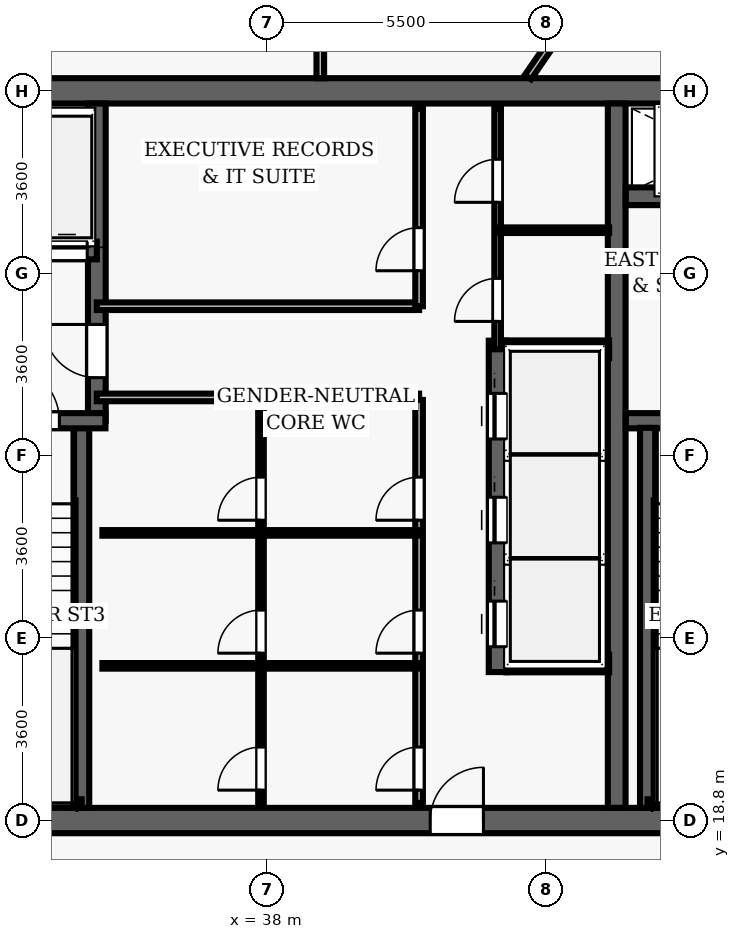
"""IFC4 building model, lengths in metres.
Left out: names, types, materials, properties, quantities, classifications, styles, units other than length and angle.
Written with IfcOpenShell. Run it as: python <this file> out.ifc"""

import sys

from ifc_helpers import new_model, si_unit, direction, frame, frame_2d, origin, place, context, subcontext, project, spatial, rectangle, extrude, element, fill, save


model = new_model("IFC4")
c1 = context("Model", 3, precision=1e-05, world=origin(), true_north=direction((0.0, 1.0)))
c2 = subcontext(c1, "Body", "Model", "MODEL_VIEW")
j1 = project(units=[si_unit("LENGTHUNIT", "METRE"), si_unit("PLANEANGLEUNIT", "RADIAN")], contexts=[c1])
p1 = place(None, origin())
s1 = spatial("IfcSite", under=j1, at=p1, CompositionType="ELEMENT")
p2 = place(p1, origin())
s2 = spatial("IfcBuilding", under=s1, at=p2, CompositionType="ELEMENT")
p3 = place(p2, frame((0.0, 0.0, 295.95)))
s3 = spatial("IfcBuildingStorey", under=s2, at=p3, CompositionType="ELEMENT", Elevation=295.95)
p4 = place(p3, frame((26.75, 18.8, 0.0), z_axis=(0.0, 0.0, 1.0), x_axis=(1.0, 0.0, 0.0)))
e1 = element("IfcWall", 1, at=p4, inside=s3, PredefinedType="SHEAR", context=c2, shape_type="SweptSolid", body=[
    extrude(rectangle(XDim=22.5, YDim=0.5, at=frame_2d((11.25, 0.0))), origin(), (0.0, 0.0, 1.0), 3.85),
])
p5 = place(p4, frame((14.47, 0.0, 0.0)))
e2 = element("IfcOpeningElement", 2, at=p5, cuts=e1, PredefinedType="OPENING", context=c2, shape_type="SweptSolid", body=[
    extrude(rectangle(XDim=1.05, YDim=2.15, at=frame_2d((0.525, 1.075))), frame((0.0, 0.26, 0.0), z_axis=(0.0, -1.0, 0.0), x_axis=(1.0, 0.0, 0.0)), (0.0, 0.0, 1.0), 0.52),
])
p6 = place(p3, frame((26.75, 33.2, 0.0), z_axis=(0.0, 0.0, 1.0), x_axis=(1.0, 0.0, 0.0)))
e3 = element("IfcWall", 3, at=p6, inside=s3, PredefinedType="SHEAR", context=c2, shape_type="SweptSolid", body=[
    extrude(rectangle(XDim=22.5, YDim=0.5, at=frame_2d((11.25, 0.0))), origin(), (0.0, 0.0, 1.0), 3.85),
])
p7 = place(p3, frame((44.9, 19.05, 0.0), z_axis=(0.0, 0.0, 1.0), x_axis=(0.0, 1.0, 0.0)))
e4 = element("IfcWall", 4, at=p7, inside=s3, PredefinedType="SHEAR", context=c2, shape_type="SweptSolid", body=[
    extrude(rectangle(XDim=13.9, YDim=0.35, at=frame_2d((6.95, 0.0))), origin(), (0.0, 0.0, 1.0), 3.85),
])
p8 = place(p3, frame((45.08, 26.69, 0.0), z_axis=(0.0, 0.0, 1.0), x_axis=(1.0, 0.0, 0.0)))
e5 = element("IfcWall", 5, at=p8, inside=s3, PredefinedType="SHEAR", context=c2, shape_type="SweptSolid", body=[
    extrude(rectangle(XDim=3.67, YDim=0.3, at=frame_2d((1.835, 0.0))), origin(), (0.0, 0.0, 1.0), 3.85),
])
p9 = place(p8, frame((1.05, 0.0, 0.0)))
e6 = element("IfcOpeningElement", 6, at=p9, cuts=e5, PredefinedType="OPENING", context=c2, shape_type="SweptSolid", body=[
    extrude(rectangle(XDim=1.1, YDim=2.15, at=frame_2d((0.55, 1.075))), frame((0.0, 0.16, 0.0), z_axis=(0.0, -1.0, 0.0), x_axis=(1.0, 0.0, 0.0)), (0.0, 0.0, 1.0), 0.32),
])
p10 = place(p3, frame((45.51, 19.05, 0.0), z_axis=(0.0, 0.0, 1.0), x_axis=(0.0, 1.0, 0.0)))
e7 = element("IfcWall", 7, at=p10, inside=s3, PredefinedType="SHEAR", context=c2, shape_type="SweptSolid", body=[
    extrude(rectangle(XDim=7.5, YDim=0.3, at=frame_2d((3.75, 0.0))), origin(), (0.0, 0.0, 1.0), 3.85),
])
p11 = place(p3, frame((45.51, 19.16, 0.0), z_axis=(0.0, 0.0, 1.0), x_axis=(1.0, 0.0, 0.0)))
e8 = element("IfcWall", 8, at=p11, inside=s3, PredefinedType="SHEAR", context=c2, shape_type="SweptSolid", body=[
    extrude(rectangle(XDim=3.095, YDim=0.12, at=frame_2d((1.547, 0.0))), origin(), (0.0, 0.0, 1.0), 3.85),
])
p12 = place(p3, frame((45.08, 31.12, 0.0), z_axis=(0.0, 0.0, 1.0), x_axis=(1.0, 0.0, 0.0)))
e9 = element("IfcWall", 9, at=p12, inside=s3, PredefinedType="SHEAR", context=c2, shape_type="SweptSolid", body=[
    extrude(rectangle(XDim=3.67, YDim=0.35, at=frame_2d((1.835, 0.0))), origin(), (0.0, 0.0, 1.0), 3.04),
])
p13 = place(p12, frame((1.25, 0.0, 0.0)))
e10 = element("IfcOpeningElement", 10, at=p13, cuts=e9, PredefinedType="OPENING", context=c2, shape_type="SweptSolid", body=[
    extrude(rectangle(XDim=1.1, YDim=2.15, at=frame_2d((0.55, 1.075))), frame((0.0, 0.185, 0.0), z_axis=(0.0, -1.0, 0.0), x_axis=(1.0, 0.0, 0.0)), (0.0, 0.0, 1.0), 0.37),
])
p14 = place(p3, frame((34.34, 19.05, 0.0), z_axis=(0.0, 0.0, 1.0), x_axis=(0.0, 1.0, 0.0)))
e11 = element("IfcWall", 11, at=p14, inside=s3, PredefinedType="SHEAR", context=c2, shape_type="SweptSolid", body=[
    extrude(rectangle(XDim=7.5, YDim=0.3, at=frame_2d((3.75, 0.0))), origin(), (0.0, 0.0, 1.0), 3.85),
])
p15 = place(p3, frame((34.64, 26.69, 0.0), z_axis=(0.0, 0.0, 1.0), x_axis=(0.0, 1.0, 0.0)))
e12 = element("IfcWall", 12, at=p15, inside=s3, PredefinedType="SHEAR", context=c2, shape_type="SweptSolid", body=[
    extrude(rectangle(XDim=6.26, YDim=0.35, at=frame_2d((3.13, 0.0))), origin(), (0.0, 0.0, 1.0), 3.85),
])
p16 = place(p15, frame((0.85, 0.0, 0.0)))
e13 = element("IfcOpeningElement", 13, at=p16, cuts=e12, PredefinedType="OPENING", context=c2, shape_type="SweptSolid", body=[
    extrude(rectangle(XDim=1.05, YDim=2.15, at=frame_2d((0.525, 1.075))), frame((0.0, 0.185, 0.0), z_axis=(0.0, -1.0, 0.0), x_axis=(1.0, 0.0, 0.0)), (0.0, 0.0, 1.0), 0.37),
])
p17 = place(p3, frame((31.25, 26.69, 0.0), z_axis=(0.0, 0.0, 1.0), x_axis=(1.0, 0.0, 0.0)))
e14 = element("IfcWall", 14, at=p17, inside=s3, PredefinedType="SHEAR", context=c2, shape_type="SweptSolid", body=[
    extrude(rectangle(XDim=3.56, YDim=0.3, at=frame_2d((1.78, 0.0))), origin(), (0.0, 0.0, 1.0), 3.85),
])
p18 = place(p17, frame((1.55, 0.0, 0.0)))
e15 = element("IfcOpeningElement", 15, at=p18, cuts=e14, PredefinedType="OPENING", context=c2, shape_type="SweptSolid", body=[
    extrude(rectangle(XDim=1.1, YDim=2.15, at=frame_2d((0.55, 1.075))), frame((0.0, 0.16, 0.0), z_axis=(0.0, -1.0, 0.0), x_axis=(1.0, 0.0, 0.0)), (0.0, 0.0, 1.0), 0.32),
])
p19 = place(p3, frame((31.3, 19.16, 0.0), z_axis=(0.0, 0.0, 1.0), x_axis=(1.0, 0.0, 0.0)))
e16 = element("IfcWall", 16, at=p19, inside=s3, PredefinedType="SHEAR", context=c2, shape_type="SweptSolid", body=[
    extrude(rectangle(XDim=3.04, YDim=0.12, at=frame_2d((1.52, 0.0))), origin(), (0.0, 0.0, 1.0), 3.85),
])
p20 = place(p3, frame((32.23, 30.05, 0.0), z_axis=(0.0, 0.0, 1.0), x_axis=(1.0, 0.0, 0.0)))
e17 = element("IfcWall", 17, at=p20, inside=s3, PredefinedType="SHEAR", context=c2, shape_type="SweptSolid", body=[
    extrude(rectangle(XDim=2.41, YDim=0.35, at=frame_2d((1.205, 0.0))), origin(), (0.0, 0.0, 1.0), 3.04),
])
p21 = place(p20, frame((0.42, 0.0, 0.0)))
e18 = element("IfcOpeningElement", 18, at=p21, cuts=e17, PredefinedType="OPENING", context=c2, shape_type="SweptSolid", body=[
    extrude(rectangle(XDim=0.8, YDim=2.15, at=frame_2d((0.4, 1.075))), frame((0.0, 0.185, 0.0), z_axis=(0.0, -1.0, 0.0), x_axis=(1.0, 0.0, 0.0)), (0.0, 0.0, 1.0), 0.37),
])
p22 = place(p20, frame((1.42, 0.0, 0.0)))
e19 = element("IfcOpeningElement", 19, at=p22, cuts=e17, PredefinedType="OPENING", context=c2, shape_type="SweptSolid", body=[
    extrude(rectangle(XDim=0.8, YDim=2.15, at=frame_2d((0.4, 1.075))), frame((0.0, 0.185, 0.0), z_axis=(0.0, -1.0, 0.0), x_axis=(1.0, 0.0, 0.0)), (0.0, 0.0, 1.0), 0.37),
])
p23 = place(p3, frame((42.55, 21.73, 0.0), z_axis=(0.0, 0.0, 1.0), x_axis=(0.0, 1.0, 0.0)))
e20 = element("IfcWall", 20, at=p23, inside=s3, PredefinedType="SHEAR", context=c2, shape_type="SweptSolid", body=[
    extrude(rectangle(XDim=6.54, YDim=0.35, at=frame_2d((3.27, 0.0))), origin(), (0.0, 0.0, 1.0), 3.04),
])
p24 = place(p23, frame((0.5, 0.0, 0.0)))
e21 = element("IfcOpeningElement", 21, at=p24, cuts=e20, PredefinedType="OPENING", context=c2, shape_type="SweptSolid", body=[
    extrude(rectangle(XDim=0.9, YDim=2.15, at=frame_2d((0.45, 1.075))), frame((0.0, 0.185, 0.0), z_axis=(0.0, -1.0, 0.0), x_axis=(1.0, 0.0, 0.0)), (0.0, 0.0, 1.0), 0.37),
])
p25 = place(p23, frame((2.55, 0.0, 0.0)))
e22 = element("IfcOpeningElement", 22, at=p25, cuts=e20, PredefinedType="OPENING", context=c2, shape_type="SweptSolid", body=[
    extrude(rectangle(XDim=0.9, YDim=2.15, at=frame_2d((0.45, 1.075))), frame((0.0, 0.185, 0.0), z_axis=(0.0, -1.0, 0.0), x_axis=(1.0, 0.0, 0.0)), (0.0, 0.0, 1.0), 0.37),
])
p26 = place(p23, frame((4.6, 0.0, 0.0)))
e23 = element("IfcOpeningElement", 23, at=p26, cuts=e20, PredefinedType="OPENING", context=c2, shape_type="SweptSolid", body=[
    extrude(rectangle(XDim=0.9, YDim=2.15, at=frame_2d((0.45, 1.075))), frame((0.0, 0.185, 0.0), z_axis=(0.0, -1.0, 0.0), x_axis=(1.0, 0.0, 0.0)), (0.0, 0.0, 1.0), 0.37),
])
for number, where, z_axis, x_axis in (
    (24, (42.72, 21.9, 0.0), (0.0, 0.0, 1.0), (1.0, 0.0, 0.0)),
    (25, (42.72, 28.1, 0.0), (0.0, 0.0, 1.0), (1.0, 0.0, 0.0)),
):
    element("IfcWall", number, at=place(p3, frame(where, z_axis=z_axis, x_axis=x_axis)), inside=s3, PredefinedType="SHEAR", context=c2, shape_type="SweptSolid", body=[
        extrude(rectangle(XDim=2.03, YDim=0.35, at=frame_2d((1.015, 0.0))), origin(), (0.0, 0.0, 1.0), 3.04),
    ])
for number, where, z_axis, x_axis in (
    (26, (34.64, 27.15, 0.0), (0.0, 0.0, 1.0), (1.0, 0.0, 0.0)),
    (27, (34.64, 28.95, 0.0), (0.0, 0.0, 1.0), (1.0, 0.0, 0.0)),
):
    element("IfcWall", number, at=place(p3, frame(where, z_axis=z_axis, x_axis=x_axis)), inside=s3, PredefinedType="PARTITIONING", context=c2, shape_type="SweptSolid", body=[
        extrude(rectangle(XDim=6.36, YDim=0.15, at=frame_2d((3.18, 0.0))), origin(), (0.0, 0.0, 1.0), 3.04),
    ])
p27 = place(p3, frame((41.0, 28.95, 0.0), z_axis=(0.0, 0.0, 1.0), x_axis=(0.0, 1.0, 0.0)))
e28 = element("IfcWall", 28, at=p27, inside=s3, PredefinedType="PARTITIONING", context=c2, shape_type="SweptSolid", body=[
    extrude(rectangle(XDim=3.9, YDim=0.15, at=frame_2d((1.95, 0.0))), origin(), (0.0, 0.0, 1.0), 3.04),
])
p28 = place(p27, frame((0.7, 0.0, 0.0)))
e29 = element("IfcOpeningElement", 29, at=p28, cuts=e28, PredefinedType="OPENING", context=c2, shape_type="SweptSolid", body=[
    extrude(rectangle(XDim=0.85, YDim=2.1, at=frame_2d((0.425, 1.05))), frame((0.0, 0.085, 0.0), z_axis=(0.0, -1.0, 0.0), x_axis=(1.0, 0.0, 0.0)), (0.0, 0.0, 1.0), 0.17),
])
p29 = place(p3, frame((41.0, 19.15, 0.0), z_axis=(0.0, 0.0, 1.0), x_axis=(0.0, 1.0, 0.0)))
e30 = element("IfcWall", 30, at=p29, inside=s3, PredefinedType="PARTITIONING", context=c2, shape_type="SweptSolid", body=[
    extrude(rectangle(XDim=7.95, YDim=0.15, at=frame_2d((3.975, 0.0))), origin(), (0.0, 0.0, 1.0), 3.04),
])
p30 = place(p29, frame((0.25, 0.0, 0.0)))
e31 = element("IfcOpeningElement", 31, at=p30, cuts=e30, PredefinedType="OPENING", context=c2, shape_type="SweptSolid", body=[
    extrude(rectangle(XDim=0.85, YDim=2.1, at=frame_2d((0.425, 1.05))), frame((0.0, 0.085, 0.0), z_axis=(0.0, -1.0, 0.0), x_axis=(1.0, 0.0, 0.0)), (0.0, 0.0, 1.0), 0.17),
])
p31 = place(p29, frame((2.953, 0.0, 0.0)))
e32 = element("IfcOpeningElement", 32, at=p31, cuts=e30, PredefinedType="OPENING", context=c2, shape_type="SweptSolid", body=[
    extrude(rectangle(XDim=0.85, YDim=2.1, at=frame_2d((0.425, 1.05))), frame((0.0, 0.085, 0.0), z_axis=(0.0, -1.0, 0.0), x_axis=(1.0, 0.0, 0.0)), (0.0, 0.0, 1.0), 0.17),
])
p32 = place(p29, frame((5.576, 0.0, 0.0)))
e33 = element("IfcOpeningElement", 33, at=p32, cuts=e30, PredefinedType="OPENING", context=c2, shape_type="SweptSolid", body=[
    extrude(rectangle(XDim=0.85, YDim=2.1, at=frame_2d((0.425, 1.05))), frame((0.0, 0.085, 0.0), z_axis=(0.0, -1.0, 0.0), x_axis=(1.0, 0.0, 0.0)), (0.0, 0.0, 1.0), 0.17),
])
p33 = place(p3, frame((37.88, 19.15, 0.0), z_axis=(0.0, 0.0, 1.0), x_axis=(0.0, 1.0, 0.0)))
e34 = element("IfcWall", 34, at=p33, inside=s3, PredefinedType="PARTITIONING", context=c2, shape_type="SweptSolid", body=[
    extrude(rectangle(XDim=7.95, YDim=0.11, at=frame_2d((3.975, 0.0))), origin(), (0.0, 0.0, 1.0), 3.04),
])
p34 = place(p33, frame((0.25, 0.0, 0.0)))
e35 = element("IfcOpeningElement", 35, at=p34, cuts=e34, PredefinedType="OPENING", context=c2, shape_type="SweptSolid", body=[
    extrude(rectangle(XDim=0.85, YDim=2.1, at=frame_2d((0.425, 1.05))), frame((0.0, 0.065, 0.0), z_axis=(0.0, -1.0, 0.0), x_axis=(1.0, 0.0, 0.0)), (0.0, 0.0, 1.0), 0.13),
])
p35 = place(p33, frame((2.953, 0.0, 0.0)))
e36 = element("IfcOpeningElement", 36, at=p35, cuts=e34, PredefinedType="OPENING", context=c2, shape_type="SweptSolid", body=[
    extrude(rectangle(XDim=0.85, YDim=2.1, at=frame_2d((0.425, 1.05))), frame((0.0, 0.065, 0.0), z_axis=(0.0, -1.0, 0.0), x_axis=(1.0, 0.0, 0.0)), (0.0, 0.0, 1.0), 0.13),
])
p36 = place(p33, frame((5.576, 0.0, 0.0)))
e37 = element("IfcOpeningElement", 37, at=p36, cuts=e34, PredefinedType="OPENING", context=c2, shape_type="SweptSolid", body=[
    extrude(rectangle(XDim=0.85, YDim=2.1, at=frame_2d((0.425, 1.05))), frame((0.0, 0.065, 0.0), z_axis=(0.0, -1.0, 0.0), x_axis=(1.0, 0.0, 0.0)), (0.0, 0.0, 1.0), 0.13),
])
for number, where, z_axis, x_axis in (
    (38, (34.75, 21.853, 0.0), (0.0, 0.0, 1.0), (1.0, 0.0, 0.0)),
    (39, (34.75, 24.477, 0.0), (0.0, 0.0, 1.0), (1.0, 0.0, 0.0)),
):
    element("IfcWall", number, at=place(p3, frame(where, z_axis=z_axis, x_axis=x_axis)), inside=s3, PredefinedType="PARTITIONING", context=c2, shape_type="SweptSolid", body=[
        extrude(rectangle(XDim=6.25, YDim=0.11, at=frame_2d((3.125, 0.0))), origin(), (0.0, 0.0, 1.0), 3.04),
    ])
p37 = place(p3, frame((42.55, 28.1, 0.0), z_axis=(0.0, 0.0, 1.0), x_axis=(0.0, 1.0, 0.0)))
e40 = element("IfcWall", 40, at=p37, inside=s3, PredefinedType="PARTITIONING", context=c2, shape_type="SweptSolid", body=[
    extrude(rectangle(XDim=4.75, YDim=0.13, at=frame_2d((2.375, 0.0))), origin(), (0.0, 0.0, 1.0), 3.04),
])
p38 = place(p37, frame((0.55, 0.0, 0.0)))
e41 = element("IfcOpeningElement", 41, at=p38, cuts=e40, PredefinedType="OPENING", context=c2, shape_type="SweptSolid", body=[
    extrude(rectangle(XDim=0.85, YDim=2.1, at=frame_2d((0.425, 1.05))), frame((0.0, 0.075, 0.0), z_axis=(0.0, -1.0, 0.0), x_axis=(1.0, 0.0, 0.0)), (0.0, 0.0, 1.0), 0.15),
])
p39 = place(p37, frame((2.9, 0.0, 0.0)))
e42 = element("IfcOpeningElement", 42, at=p39, cuts=e40, PredefinedType="OPENING", context=c2, shape_type="SweptSolid", body=[
    extrude(rectangle(XDim=0.85, YDim=2.1, at=frame_2d((0.425, 1.05))), frame((0.0, 0.075, 0.0), z_axis=(0.0, -1.0, 0.0), x_axis=(1.0, 0.0, 0.0)), (0.0, 0.0, 1.0), 0.15),
])
p40 = place(p3, frame((42.55, 30.45, 0.0), z_axis=(0.0, 0.0, 1.0), x_axis=(1.0, 0.0, 0.0)))
e43 = element("IfcWall", 43, at=p40, inside=s3, PredefinedType="PARTITIONING", context=c2, shape_type="SweptSolid", body=[
    extrude(rectangle(XDim=2.2, YDim=0.11, at=frame_2d((1.1, 0.0))), origin(), (0.0, 0.0, 1.0), 3.04),
])
p41 = place(p3, frame((39.05, 33.45, 0.0), z_axis=(0.0, 0.0, 1.0), x_axis=(0.0, 1.0, 0.0)))
e44 = element("IfcWall", 44, at=p41, inside=s3, PredefinedType="PARTITIONING", context=c2, shape_type="SweptSolid", body=[
    extrude(rectangle(XDim=6.95, YDim=0.15, at=frame_2d((3.475, 0.0))), origin(), (0.0, 0.0, 1.0), 3.04),
])
p42 = place(p41, frame((0.988, 0.0, 0.0)))
e45 = element("IfcOpeningElement", 45, at=p42, cuts=e44, PredefinedType="OPENING", context=c2, shape_type="SweptSolid", body=[
    extrude(rectangle(XDim=1.5, YDim=2.2, at=frame_2d((0.75, 1.1))), frame((0.0, 0.085, 0.0), z_axis=(0.0, -1.0, 0.0), x_axis=(1.0, 0.0, 0.0)), (0.0, 0.0, 1.0), 0.17),
])
p43 = place(p3, frame((43.148, 33.47, 0.0), z_axis=(0.0, 0.0, 1.0), x_axis=(0.56742778263, 0.823423166725, 0.0)))
e46 = element("IfcWall", 46, at=p43, inside=s3, PredefinedType="PARTITIONING", context=c2, shape_type="SweptSolid", body=[
    extrude(rectangle(XDim=12.639, YDim=0.15, at=frame_2d((6.32, 0.0))), origin(), (0.0, 0.0, 1.0), 3.04),
])
p44 = place(p18, origin())
e47 = element("IfcDoor", 47, at=p44, inside=s3, OperationType="SINGLE_SWING_LEFT", PredefinedType="DOOR", context=c2, shape_type="SweptSolid", body=[
    extrude(rectangle(XDim=1.1, YDim=2.15, at=frame_2d((0.55, 1.075))), frame((0.0, 0.025, 0.0), z_axis=(0.0, -1.0, 0.0), x_axis=(1.0, 0.0, 0.0)), (0.0, 0.0, 1.0), 0.05),
])
fill(e15, e47)
p45 = place(p5, origin())
e48 = element("IfcDoor", 48, at=p45, inside=s3, OperationType="SINGLE_SWING_RIGHT", PredefinedType="DOOR", context=c2, shape_type="SweptSolid", body=[
    extrude(rectangle(XDim=1.05, YDim=2.15, at=frame_2d((0.525, 1.075))), frame((0.0, 0.025, 0.0), z_axis=(0.0, -1.0, 0.0), x_axis=(1.0, 0.0, 0.0)), (0.0, 0.0, 1.0), 0.05),
])
fill(e2, e48)
p46 = place(p16, origin())
e49 = element("IfcDoor", 49, at=p46, inside=s3, OperationType="SINGLE_SWING_RIGHT", PredefinedType="DOOR", context=c2, shape_type="SweptSolid", body=[
    extrude(rectangle(XDim=1.05, YDim=2.15, at=frame_2d((0.525, 1.075))), frame((0.0, 0.025, 0.0), z_axis=(0.0, -1.0, 0.0), x_axis=(1.0, 0.0, 0.0)), (0.0, 0.0, 1.0), 0.05),
])
fill(e13, e49)
p47 = place(p28, origin())
e50 = element("IfcDoor", 50, at=p47, inside=s3, OperationType="SINGLE_SWING_LEFT", PredefinedType="DOOR", context=c2, shape_type="SweptSolid", body=[
    extrude(rectangle(XDim=0.85, YDim=2.1, at=frame_2d((0.425, 1.05))), frame((0.0, 0.025, 0.0), z_axis=(0.0, -1.0, 0.0), x_axis=(1.0, 0.0, 0.0)), (0.0, 0.0, 1.0), 0.05),
])
fill(e29, e50)
p48 = place(p30, origin())
e51 = element("IfcDoor", 51, at=p48, inside=s3, OperationType="SINGLE_SWING_LEFT", PredefinedType="DOOR", context=c2, shape_type="SweptSolid", body=[
    extrude(rectangle(XDim=0.85, YDim=2.1, at=frame_2d((0.425, 1.05))), frame((0.0, 0.025, 0.0), z_axis=(0.0, -1.0, 0.0), x_axis=(1.0, 0.0, 0.0)), (0.0, 0.0, 1.0), 0.05),
])
fill(e31, e51)
p49 = place(p34, origin())
e52 = element("IfcDoor", 52, at=p49, inside=s3, OperationType="SINGLE_SWING_LEFT", PredefinedType="DOOR", context=c2, shape_type="SweptSolid", body=[
    extrude(rectangle(XDim=0.85, YDim=2.1, at=frame_2d((0.425, 1.05))), frame((0.0, 0.025, 0.0), z_axis=(0.0, -1.0, 0.0), x_axis=(1.0, 0.0, 0.0)), (0.0, 0.0, 1.0), 0.05),
])
fill(e35, e52)
p50 = place(p31, origin())
e53 = element("IfcDoor", 53, at=p50, inside=s3, OperationType="SINGLE_SWING_LEFT", PredefinedType="DOOR", context=c2, shape_type="SweptSolid", body=[
    extrude(rectangle(XDim=0.85, YDim=2.1, at=frame_2d((0.425, 1.05))), frame((0.0, 0.025, 0.0), z_axis=(0.0, -1.0, 0.0), x_axis=(1.0, 0.0, 0.0)), (0.0, 0.0, 1.0), 0.05),
])
fill(e32, e53)
p51 = place(p35, origin())
e54 = element("IfcDoor", 54, at=p51, inside=s3, OperationType="SINGLE_SWING_LEFT", PredefinedType="DOOR", context=c2, shape_type="SweptSolid", body=[
    extrude(rectangle(XDim=0.85, YDim=2.1, at=frame_2d((0.425, 1.05))), frame((0.0, 0.025, 0.0), z_axis=(0.0, -1.0, 0.0), x_axis=(1.0, 0.0, 0.0)), (0.0, 0.0, 1.0), 0.05),
])
fill(e36, e54)
p52 = place(p32, origin())
e55 = element("IfcDoor", 55, at=p52, inside=s3, OperationType="SINGLE_SWING_LEFT", PredefinedType="DOOR", context=c2, shape_type="SweptSolid", body=[
    extrude(rectangle(XDim=0.85, YDim=2.1, at=frame_2d((0.425, 1.05))), frame((0.0, 0.025, 0.0), z_axis=(0.0, -1.0, 0.0), x_axis=(1.0, 0.0, 0.0)), (0.0, 0.0, 1.0), 0.05),
])
fill(e33, e55)
p53 = place(p36, origin())
e56 = element("IfcDoor", 56, at=p53, inside=s3, OperationType="SINGLE_SWING_LEFT", PredefinedType="DOOR", context=c2, shape_type="SweptSolid", body=[
    extrude(rectangle(XDim=0.85, YDim=2.1, at=frame_2d((0.425, 1.05))), frame((0.0, 0.025, 0.0), z_axis=(0.0, -1.0, 0.0), x_axis=(1.0, 0.0, 0.0)), (0.0, 0.0, 1.0), 0.05),
])
fill(e37, e56)
p54 = place(p38, origin())
e57 = element("IfcDoor", 57, at=p54, inside=s3, OperationType="SINGLE_SWING_LEFT", PredefinedType="DOOR", context=c2, shape_type="SweptSolid", body=[
    extrude(rectangle(XDim=0.85, YDim=2.1, at=frame_2d((0.425, 1.05))), frame((0.0, 0.025, 0.0), z_axis=(0.0, -1.0, 0.0), x_axis=(1.0, 0.0, 0.0)), (0.0, 0.0, 1.0), 0.05),
])
fill(e41, e57)
p55 = place(p39, origin())
e58 = element("IfcDoor", 58, at=p55, inside=s3, OperationType="SINGLE_SWING_LEFT", PredefinedType="DOOR", context=c2, shape_type="SweptSolid", body=[
    extrude(rectangle(XDim=0.85, YDim=2.1, at=frame_2d((0.425, 1.05))), frame((0.0, 0.025, 0.0), z_axis=(0.0, -1.0, 0.0), x_axis=(1.0, 0.0, 0.0)), (0.0, 0.0, 1.0), 0.05),
])
fill(e42, e58)
p56 = place(p24, origin())
e59 = element("IfcDoor", 59, at=p56, inside=s3, OperationType="SLIDING_TO_LEFT", PredefinedType="DOOR", context=c2, shape_type="SweptSolid", body=[
    extrude(rectangle(XDim=0.9, YDim=2.15, at=frame_2d((0.45, 1.075))), frame((0.0, 0.025, 0.0), z_axis=(0.0, -1.0, 0.0), x_axis=(1.0, 0.0, 0.0)), (0.0, 0.0, 1.0), 0.05),
])
fill(e21, e59)
p57 = place(p25, origin())
e60 = element("IfcDoor", 60, at=p57, inside=s3, OperationType="SLIDING_TO_LEFT", PredefinedType="DOOR", context=c2, shape_type="SweptSolid", body=[
    extrude(rectangle(XDim=0.9, YDim=2.15, at=frame_2d((0.45, 1.075))), frame((0.0, 0.025, 0.0), z_axis=(0.0, -1.0, 0.0), x_axis=(1.0, 0.0, 0.0)), (0.0, 0.0, 1.0), 0.05),
])
fill(e22, e60)
p58 = place(p26, origin())
e61 = element("IfcDoor", 61, at=p58, inside=s3, OperationType="SLIDING_TO_LEFT", PredefinedType="DOOR", context=c2, shape_type="SweptSolid", body=[
    extrude(rectangle(XDim=0.9, YDim=2.15, at=frame_2d((0.45, 1.075))), frame((0.0, 0.025, 0.0), z_axis=(0.0, -1.0, 0.0), x_axis=(1.0, 0.0, 0.0)), (0.0, 0.0, 1.0), 0.05),
])
fill(e23, e61)
p59 = place(p22, origin())
e62 = element("IfcDoor", 62, at=p59, inside=s3, OperationType="SLIDING_TO_LEFT", PredefinedType="DOOR", context=c2, shape_type="SweptSolid", body=[
    extrude(rectangle(XDim=0.8, YDim=2.15, at=frame_2d((0.4, 1.075))), frame((0.0, 0.025, 0.0), z_axis=(0.0, -1.0, 0.0), x_axis=(1.0, 0.0, 0.0)), (0.0, 0.0, 1.0), 0.05),
])
fill(e19, e62)
save(model, sys.argv[1])
